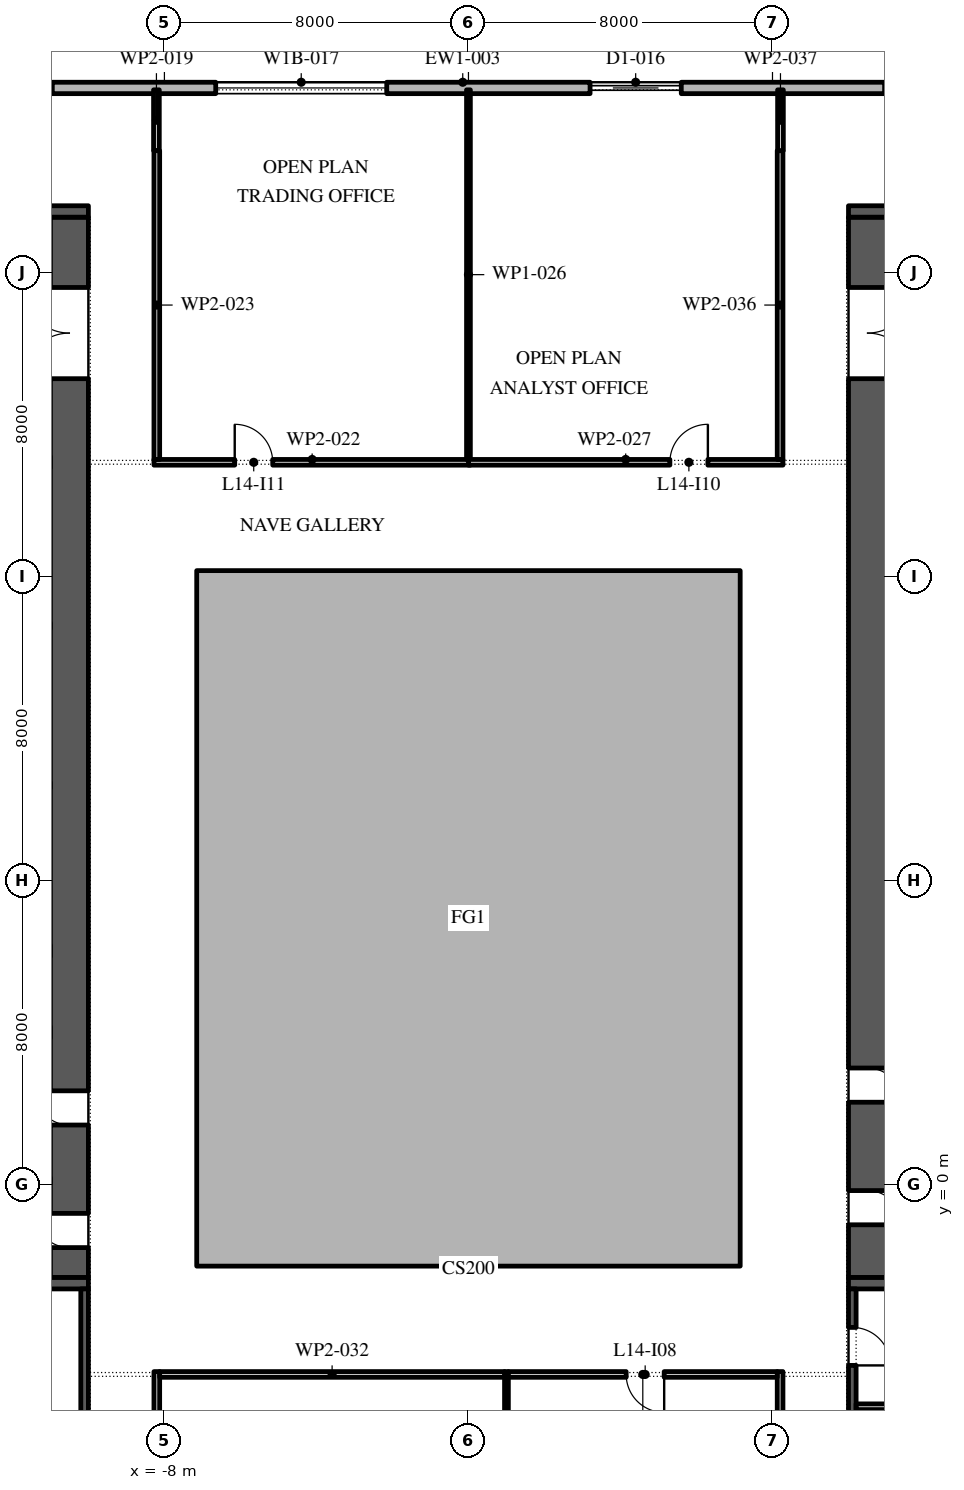
"""IFC4 building model, lengths in metres.
Left out: names, types, materials, properties, quantities, classifications, styles, units other than length and angle.
Written with IfcOpenShell. Run it as: python <this file> out.ifc"""

import sys

from ifc_helpers import new_model, si_unit, direction, frame, frame_2d, origin, place, context, subcontext, project, spatial, polyline, rectangle, outline, extrude, element, fill, save


model = new_model("IFC4")
c1 = context("Model", 3, precision=1e-05, world=origin(), true_north=direction((0.0, 1.0)))
c2 = subcontext(c1, "Body", "Model", "MODEL_VIEW")
j1 = project(units=[si_unit("LENGTHUNIT", "METRE"), si_unit("PLANEANGLEUNIT", "RADIAN")], contexts=[c1])
p1 = place(None, origin())
s1 = spatial("IfcSite", under=j1, at=p1, CompositionType="ELEMENT")
p2 = place(p1, origin())
s2 = spatial("IfcBuilding", under=s1, at=p2, CompositionType="ELEMENT")
p3 = place(p2, frame((0.0, 0.0, 69.0)))
s3 = spatial("IfcBuildingStorey", under=s2, at=p3, CompositionType="ELEMENT", Elevation=69.0)
p4 = place(p3, origin())
e1 = element("IfcWall", 1, at=p4, inside=s3, PredefinedType="STANDARD", context=c2, shape_type="SweptSolid", body=[
    extrude(outline(polyline([(-7.15, -2.15), (7.15, -2.15), (7.15, 16.15), (-7.15, 16.15), (-7.15, -2.15)]), holes=[polyline([(-7.0, -2.0), (-7.0, 16.0), (7.0, 16.0), (7.0, -2.0), (-7.0, -2.0)])]), origin(), (0.0, 0.0, 1.0), 4.0),
])
p5 = place(p3, frame((26.1, 28.85, 0.0), z_axis=(0.0, 0.0, 1.0), x_axis=(-1.0, 0.0, 0.0)))
e2 = element("IfcWall", 2, at=p5, inside=s3, PredefinedType="STANDARD", context=c2, shape_type="SweptSolid", body=[
    extrude(rectangle(XDim=52.5, YDim=0.3, at=frame_2d((26.25, 0.0))), origin(), (0.0, 0.0, 1.0), 4.0),
])
p6 = place(p5, frame((2.0, 0.0, 0.45)))
e3 = element("IfcOpeningElement", 3, at=p6, cuts=e2, PredefinedType="OPENING", context=c2, shape_type="SweptSolid", body=[
    extrude(rectangle(XDim=4.5, YDim=2.95, at=frame_2d((2.25, 1.475))), frame((0.0, 0.16, 0.0), z_axis=(0.0, -1.0, 0.0), x_axis=(1.0, 0.0, 0.0)), (0.0, 0.0, 1.0), 0.32),
])
p7 = place(p5, frame((10.65, 0.0, 0.45)))
e4 = element("IfcOpeningElement", 4, at=p7, cuts=e2, PredefinedType="OPENING", context=c2, shape_type="SweptSolid", body=[
    extrude(rectangle(XDim=4.5, YDim=2.95, at=frame_2d((2.25, 1.475))), frame((0.0, 0.16, 0.0), z_axis=(0.0, -1.0, 0.0), x_axis=(1.0, 0.0, 0.0)), (0.0, 0.0, 1.0), 0.32),
])
p8 = place(p5, frame((20.5, 0.0, 0.0)))
e5 = element("IfcOpeningElement", 5, at=p8, cuts=e2, PredefinedType="OPENING", context=c2, shape_type="SweptSolid", body=[
    extrude(rectangle(XDim=2.4, YDim=3.5, at=frame_2d((1.2, 1.75))), frame((0.0, 0.16, 0.0), z_axis=(0.0, -1.0, 0.0), x_axis=(1.0, 0.0, 0.0)), (0.0, 0.0, 1.0), 0.32),
])
p9 = place(p5, frame((28.25, 0.0, 0.45)))
e6 = element("IfcOpeningElement", 6, at=p9, cuts=e2, PredefinedType="OPENING", context=c2, shape_type="SweptSolid", body=[
    extrude(rectangle(XDim=4.5, YDim=2.95, at=frame_2d((2.25, 1.475))), frame((0.0, 0.16, 0.0), z_axis=(0.0, -1.0, 0.0), x_axis=(1.0, 0.0, 0.0)), (0.0, 0.0, 1.0), 0.32),
])
p10 = place(p5, frame((37.05, 0.0, 0.45)))
e7 = element("IfcOpeningElement", 7, at=p10, cuts=e2, PredefinedType="OPENING", context=c2, shape_type="SweptSolid", body=[
    extrude(rectangle(XDim=4.5, YDim=2.95, at=frame_2d((2.25, 1.475))), frame((0.0, 0.16, 0.0), z_axis=(0.0, -1.0, 0.0), x_axis=(1.0, 0.0, 0.0)), (0.0, 0.0, 1.0), 0.32),
])
p11 = place(p5, frame((45.85, 0.0, 0.45)))
e8 = element("IfcOpeningElement", 8, at=p11, cuts=e2, PredefinedType="OPENING", context=c2, shape_type="SweptSolid", body=[
    extrude(rectangle(XDim=4.5, YDim=2.95, at=frame_2d((2.25, 1.475))), frame((0.0, 0.16, 0.0), z_axis=(0.0, -1.0, 0.0), x_axis=(1.0, 0.0, 0.0)), (0.0, 0.0, 1.0), 0.32),
])
p12 = place(p3, frame((-10.5, -2.45, 0.0), z_axis=(0.0, 0.0, 1.0), x_axis=(0.0, 1.0, 0.0)))
e9 = element("IfcWall", 9, at=p12, inside=s3, PredefinedType="SHEAR", context=c2, shape_type="SweptSolid", body=[
    extrude(rectangle(XDim=27.9, YDim=1.0, at=frame_2d((13.95, 0.0))), origin(), (0.0, 0.0, 1.0), 4.0),
])
p13 = place(p12, frame((23.65, 0.0, 0.0)))
e10 = element("IfcOpeningElement", 10, at=p13, cuts=e9, PredefinedType="OPENING", context=c2, shape_type="SweptSolid", body=[
    extrude(rectangle(XDim=2.4, YDim=2.1, at=frame_2d((1.2, 1.05))), frame((0.0, 0.51, 0.0), z_axis=(0.0, -1.0, 0.0), x_axis=(1.0, 0.0, 0.0)), (0.0, 0.0, 1.0), 1.02),
])
p14 = place(p12, frame((0.788, 0.0, 0.0)))
e11 = element("IfcOpeningElement", 11, at=p14, cuts=e9, PredefinedType="OPENING", context=c2, shape_type="SweptSolid", body=[
    extrude(rectangle(XDim=0.9, YDim=2.1, at=frame_2d((0.45, 1.05))), frame((0.0, 0.51, 0.0), z_axis=(0.0, -1.0, 0.0), x_axis=(1.0, 0.0, 0.0)), (0.0, 0.0, 1.0), 1.02),
])
p15 = place(p12, frame((4.012, 0.0, 0.0)))
e12 = element("IfcOpeningElement", 12, at=p15, cuts=e9, PredefinedType="OPENING", context=c2, shape_type="SweptSolid", body=[
    extrude(rectangle(XDim=0.9, YDim=2.1, at=frame_2d((0.45, 1.05))), frame((0.0, 0.51, 0.0), z_axis=(0.0, -1.0, 0.0), x_axis=(1.0, 0.0, 0.0)), (0.0, 0.0, 1.0), 1.02),
])
for number, where, z_axis, x_axis in (
    (13, (-22.0, -2.6, 0.0), (0.0, 0.0, 1.0), (1.0, 0.0, 0.0)),
    (14, (-22.0, 25.6, 0.0), (0.0, 0.0, 1.0), (1.0, 0.0, 0.0)),
):
    element("IfcWall", number, at=place(p3, frame(where, z_axis=z_axis, x_axis=x_axis)), inside=s3, PredefinedType="SHEAR", context=c2, shape_type="SweptSolid", body=[
        extrude(rectangle(XDim=12.0, YDim=0.3, at=frame_2d((6.0, 0.0))), origin(), (0.0, 0.0, 1.0), 4.0),
    ])
p16 = place(p3, frame((-10.1, -15.8, 0.0), z_axis=(0.0, 0.0, 1.0), x_axis=(0.0, 1.0, 0.0)))
e15 = element("IfcWall", 15, at=p16, inside=s3, PredefinedType="SHEAR", context=c2, shape_type="SweptSolid", body=[
    extrude(rectangle(XDim=13.05, YDim=0.2, at=frame_2d((6.525, 0.0))), origin(), (0.0, 0.0, 1.0), 4.0),
])
p17 = place(p16, frame((6.075, 0.0, 0.0)))
e16 = element("IfcOpeningElement", 16, at=p17, cuts=e15, PredefinedType="OPENING", context=c2, shape_type="SweptSolid", body=[
    extrude(rectangle(XDim=0.9, YDim=2.1, at=frame_2d((0.45, 1.05))), frame((0.0, 0.11, 0.0), z_axis=(0.0, -1.0, 0.0), x_axis=(1.0, 0.0, 0.0)), (0.0, 0.0, 1.0), 0.22),
])
p18 = place(p3, frame((10.5, -2.45, 0.0), z_axis=(0.0, 0.0, 1.0), x_axis=(0.0, 1.0, 0.0)))
e17 = element("IfcWall", 17, at=p18, inside=s3, PredefinedType="SHEAR", context=c2, shape_type="SweptSolid", body=[
    extrude(rectangle(XDim=27.9, YDim=1.0, at=frame_2d((13.95, 0.0))), origin(), (0.0, 0.0, 1.0), 4.0),
])
p19 = place(p18, frame((23.65, 0.0, 0.0)))
e18 = element("IfcOpeningElement", 18, at=p19, cuts=e17, PredefinedType="OPENING", context=c2, shape_type="SweptSolid", body=[
    extrude(rectangle(XDim=2.4, YDim=2.1, at=frame_2d((1.2, 1.05))), frame((0.0, 0.51, 0.0), z_axis=(0.0, -1.0, 0.0), x_axis=(1.0, 0.0, 0.0)), (0.0, 0.0, 1.0), 1.02),
])
p20 = place(p18, frame((1.387, 0.0, 0.0)))
e19 = element("IfcOpeningElement", 19, at=p20, cuts=e17, PredefinedType="OPENING", context=c2, shape_type="SweptSolid", body=[
    extrude(rectangle(XDim=0.9, YDim=2.1, at=frame_2d((0.45, 1.05))), frame((0.0, 0.51, 0.0), z_axis=(0.0, -1.0, 0.0), x_axis=(1.0, 0.0, 0.0)), (0.0, 0.0, 1.0), 1.02),
])
p21 = place(p18, frame((4.613, 0.0, 0.0)))
e20 = element("IfcOpeningElement", 20, at=p21, cuts=e17, PredefinedType="OPENING", context=c2, shape_type="SweptSolid", body=[
    extrude(rectangle(XDim=0.9, YDim=2.1, at=frame_2d((0.45, 1.05))), frame((0.0, 0.51, 0.0), z_axis=(0.0, -1.0, 0.0), x_axis=(1.0, 0.0, 0.0)), (0.0, 0.0, 1.0), 1.02),
])
for number, where, z_axis, x_axis in (
    (21, (10.0, -2.6, 0.0), (0.0, 0.0, 1.0), (1.0, 0.0, 0.0)),
    (22, (10.0, 25.6, 0.0), (0.0, 0.0, 1.0), (1.0, 0.0, 0.0)),
):
    element("IfcWall", number, at=place(p3, frame(where, z_axis=z_axis, x_axis=x_axis)), inside=s3, PredefinedType="SHEAR", context=c2, shape_type="SweptSolid", body=[
        extrude(rectangle(XDim=12.0, YDim=0.3, at=frame_2d((6.0, 0.0))), origin(), (0.0, 0.0, 1.0), 4.0),
    ])
p22 = place(p3, frame((10.1, -15.8, 0.0), z_axis=(0.0, 0.0, 1.0), x_axis=(0.0, 1.0, 0.0)))
e23 = element("IfcWall", 23, at=p22, inside=s3, PredefinedType="SHEAR", context=c2, shape_type="SweptSolid", body=[
    extrude(rectangle(XDim=13.05, YDim=0.2, at=frame_2d((6.525, 0.0))), origin(), (0.0, 0.0, 1.0), 4.0),
])
p23 = place(p22, frame((4.488, 0.0, 0.0)))
e24 = element("IfcOpeningElement", 24, at=p23, cuts=e23, PredefinedType="OPENING", context=c2, shape_type="SweptSolid", body=[
    extrude(rectangle(XDim=0.9, YDim=2.1, at=frame_2d((0.45, 1.05))), frame((0.0, 0.11, 0.0), z_axis=(0.0, -1.0, 0.0), x_axis=(1.0, 0.0, 0.0)), (0.0, 0.0, 1.0), 0.22),
])
p24 = place(p22, frame((11.038, 0.0, 0.0)))
e25 = element("IfcOpeningElement", 25, at=p24, cuts=e23, PredefinedType="OPENING", context=c2, shape_type="SweptSolid", body=[
    extrude(rectangle(XDim=1.0, YDim=2.1, at=frame_2d((0.5, 1.05))), frame((0.0, 0.11, 0.0), z_axis=(0.0, -1.0, 0.0), x_axis=(1.0, 0.0, 0.0)), (0.0, 0.0, 1.0), 0.22),
])
p25 = place(p3, frame((10.2, -5.85, 0.0), z_axis=(0.0, 0.0, 1.0), x_axis=(1.0, 0.0, 0.0)))
e26 = element("IfcWall", 26, at=p25, inside=s3, PredefinedType="PARTITIONING", context=c2, shape_type="SweptSolid", body=[
    extrude(rectangle(XDim=11.6, YDim=0.15, at=frame_2d((5.8, 0.0))), origin(), (0.0, 0.0, 1.0), 4.0),
])
p26 = place(p3, frame((-8.21, 28.8, 0.0), z_axis=(0.0, 0.0, 1.0), x_axis=(0.0, -1.0, 0.0)))
e27 = element("IfcWall", 27, at=p26, inside=s3, PredefinedType="PARTITIONING", context=c2, shape_type="SweptSolid", body=[
    extrude(rectangle(XDim=1.6, YDim=0.15, at=frame_2d((0.8, 0.0))), origin(), (0.0, 0.0, 1.0), 4.0),
])
p27 = place(p3, frame((-8.2, -4.925, 0.0), z_axis=(0.0, 0.0, 1.0), x_axis=(0.0, -1.0, 0.0)))
e28 = element("IfcWall", 28, at=p27, inside=s3, PredefinedType="PARTITIONING", context=c2, shape_type="SweptSolid", body=[
    extrude(rectangle(XDim=12.8, YDim=0.15, at=frame_2d((6.4, 0.0))), origin(), (0.0, 0.0, 1.0), 4.0),
])
p28 = place(p27, frame((7.225, 0.0, 0.0)))
e29 = element("IfcOpeningElement", 29, at=p28, cuts=e28, PredefinedType="OPENING", context=c2, shape_type="SweptSolid", body=[
    extrude(rectangle(XDim=1.0, YDim=2.1, at=frame_2d((0.5, 1.05))), frame((0.0, 0.085, 0.0), z_axis=(0.0, -1.0, 0.0), x_axis=(1.0, 0.0, 0.0)), (0.0, 0.0, 1.0), 0.17),
])
p29 = place(p3, frame((-8.275, 19.0, 0.0), z_axis=(0.0, 0.0, 1.0), x_axis=(1.0, 0.0, 0.0)))
e30 = element("IfcWall", 30, at=p29, inside=s3, PredefinedType="PARTITIONING", context=c2, shape_type="SweptSolid", body=[
    extrude(rectangle(XDim=8.325, YDim=0.15, at=frame_2d((4.163, 0.0))), origin(), (0.0, 0.0, 1.0), 4.0),
])
p30 = place(p29, frame((2.125, 0.0, 0.0)))
e31 = element("IfcOpeningElement", 31, at=p30, cuts=e30, PredefinedType="OPENING", context=c2, shape_type="SweptSolid", body=[
    extrude(rectangle(XDim=1.0, YDim=2.1, at=frame_2d((0.5, 1.05))), frame((0.0, 0.085, 0.0), z_axis=(0.0, -1.0, 0.0), x_axis=(1.0, 0.0, 0.0)), (0.0, 0.0, 1.0), 0.17),
])
p31 = place(p3, frame((-8.2, 27.2, 0.0), z_axis=(0.0, 0.0, 1.0), x_axis=(0.0, -1.0, 0.0)))
e32 = element("IfcWall", 32, at=p31, inside=s3, PredefinedType="PARTITIONING", context=c2, shape_type="SweptSolid", body=[
    extrude(rectangle(XDim=8.125, YDim=0.15, at=frame_2d((4.062, 0.0))), origin(), (0.0, 0.0, 1.0), 4.0),
])
p32 = place(p3, frame((0.0, 19.075, 0.0), z_axis=(0.0, 0.0, 1.0), x_axis=(0.0, 1.0, 0.0)))
e33 = element("IfcWall", 33, at=p32, inside=s3, PredefinedType="PARTITIONING", context=c2, shape_type="SweptSolid", body=[
    extrude(rectangle(XDim=9.725, YDim=0.1, at=frame_2d((4.863, 0.0))), origin(), (0.0, 0.0, 1.0), 4.0),
])
p33 = place(p3, frame((0.0, 19.0, 0.0), z_axis=(0.0, 0.0, 1.0), x_axis=(1.0, 0.0, 0.0)))
e34 = element("IfcWall", 34, at=p33, inside=s3, PredefinedType="PARTITIONING", context=c2, shape_type="SweptSolid", body=[
    extrude(rectangle(XDim=8.275, YDim=0.15, at=frame_2d((4.137, 0.0))), origin(), (0.0, 0.0, 1.0), 4.0),
])
p34 = place(p33, frame((5.3, 0.0, 0.0)))
e35 = element("IfcOpeningElement", 35, at=p34, cuts=e34, PredefinedType="OPENING", context=c2, shape_type="SweptSolid", body=[
    extrude(rectangle(XDim=1.0, YDim=2.1, at=frame_2d((0.5, 1.05))), frame((0.0, 0.085, 0.0), z_axis=(0.0, -1.0, 0.0), x_axis=(1.0, 0.0, 0.0)), (0.0, 0.0, 1.0), 0.17),
])
p35 = place(p3, frame((1.0, -11.45, 0.0), z_axis=(0.0, 0.0, 1.0), x_axis=(0.0, 1.0, 0.0)))
e36 = element("IfcWall", 36, at=p35, inside=s3, PredefinedType="PARTITIONING", context=c2, shape_type="SweptSolid", body=[
    extrude(rectangle(XDim=6.525, YDim=0.1, at=frame_2d((3.262, 0.0))), origin(), (0.0, 0.0, 1.0), 4.0),
])
p36 = place(p3, frame((0.95, -5.0, 0.0), z_axis=(0.0, 0.0, 1.0), x_axis=(-1.0, 0.0, 0.0)))
e37 = element("IfcWall", 37, at=p36, inside=s3, PredefinedType="PARTITIONING", context=c2, shape_type="SweptSolid", body=[
    extrude(rectangle(XDim=9.075, YDim=0.15, at=frame_2d((4.538, 0.0))), origin(), (0.0, 0.0, 1.0), 4.0),
])
p37 = place(p3, frame((8.2, -11.45, 0.0), z_axis=(0.0, 0.0, 1.0), x_axis=(0.0, 1.0, 0.0)))
e38 = element("IfcWall", 38, at=p37, inside=s3, PredefinedType="PARTITIONING", context=c2, shape_type="SweptSolid", body=[
    extrude(rectangle(XDim=6.525, YDim=0.15, at=frame_2d((3.262, 0.0))), origin(), (0.0, 0.0, 1.0), 4.0),
])
p38 = place(p3, frame((8.125, -5.0, 0.0), z_axis=(0.0, 0.0, 1.0), x_axis=(-1.0, 0.0, 0.0)))
e39 = element("IfcWall", 39, at=p38, inside=s3, PredefinedType="PARTITIONING", context=c2, shape_type="SweptSolid", body=[
    extrude(rectangle(XDim=7.075, YDim=0.15, at=frame_2d((3.538, 0.0))), origin(), (0.0, 0.0, 1.0), 4.0),
])
p39 = place(p38, frame((2.975, 0.0, 0.0)))
e40 = element("IfcOpeningElement", 40, at=p39, cuts=e39, PredefinedType="OPENING", context=c2, shape_type="SweptSolid", body=[
    extrude(rectangle(XDim=1.0, YDim=2.1, at=frame_2d((0.5, 1.05))), frame((0.0, 0.085, 0.0), z_axis=(0.0, -1.0, 0.0), x_axis=(1.0, 0.0, 0.0)), (0.0, 0.0, 1.0), 0.17),
])
p40 = place(p3, frame((8.2, 19.075, 0.0), z_axis=(0.0, 0.0, 1.0), x_axis=(0.0, 1.0, 0.0)))
e41 = element("IfcWall", 41, at=p40, inside=s3, PredefinedType="PARTITIONING", context=c2, shape_type="SweptSolid", body=[
    extrude(rectangle(XDim=8.125, YDim=0.15, at=frame_2d((4.062, 0.0))), origin(), (0.0, 0.0, 1.0), 4.0),
])
p41 = place(p3, frame((8.21, 27.2, 0.0), z_axis=(0.0, 0.0, 1.0), x_axis=(0.0, 1.0, 0.0)))
e42 = element("IfcWall", 42, at=p41, inside=s3, PredefinedType="PARTITIONING", context=c2, shape_type="SweptSolid", body=[
    extrude(rectangle(XDim=1.6, YDim=0.15, at=frame_2d((0.8, 0.0))), origin(), (0.0, 0.0, 1.0), 4.0),
])
p42 = place(p8, origin())
e43 = element("IfcDoor", 43, at=p42, inside=s3, OperationType="DOUBLE_DOOR_SLIDING", PredefinedType="DOOR", context=c2, shape_type="SweptSolid", body=[
    extrude(rectangle(XDim=2.4, YDim=3.5, at=frame_2d((1.2, 1.75))), frame((0.0, 0.025, 0.0), z_axis=(0.0, -1.0, 0.0), x_axis=(1.0, 0.0, 0.0)), (0.0, 0.0, 1.0), 0.05),
])
fill(e5, e43)
p43 = place(p9, origin())
e44 = element("IfcWindow", 44, at=p43, inside=s3, PartitioningType="DOUBLE_PANEL_VERTICAL", PredefinedType="WINDOW", context=c2, shape_type="SweptSolid", body=[
    extrude(rectangle(XDim=4.5, YDim=2.95, at=frame_2d((2.25, 1.475))), frame((0.0, 0.03, 0.0), z_axis=(0.0, -1.0, 0.0), x_axis=(1.0, 0.0, 0.0)), (0.0, 0.0, 1.0), 0.06),
])
fill(e6, e44)
p44 = place(p13, origin())
e45 = element("IfcDoor", 45, at=p44, inside=s3, OperationType="DOUBLE_DOOR_SINGLE_SWING", PredefinedType="DOOR", context=c2, shape_type="SweptSolid", body=[
    extrude(rectangle(XDim=2.4, YDim=2.1, at=frame_2d((1.2, 1.05))), frame((0.0, 0.025, 0.0), z_axis=(0.0, -1.0, 0.0), x_axis=(1.0, 0.0, 0.0)), (0.0, 0.0, 1.0), 0.05),
])
fill(e10, e45)
p45 = place(p19, frame((2.4, 0.0, 0.0), z_axis=(0.0, 0.0, 1.0), x_axis=(-1.0, 0.0, 0.0)))
e46 = element("IfcDoor", 46, at=p45, inside=s3, OperationType="DOUBLE_DOOR_SINGLE_SWING", PredefinedType="DOOR", context=c2, shape_type="SweptSolid", body=[
    extrude(rectangle(XDim=2.4, YDim=2.1, at=frame_2d((1.2, 1.05))), frame((0.0, 0.025, 0.0), z_axis=(0.0, -1.0, 0.0), x_axis=(1.0, 0.0, 0.0)), (0.0, 0.0, 1.0), 0.05),
])
fill(e18, e46)
p46 = place(p24, frame((1.0, -0.15, 0.0), z_axis=(0.0, 0.0, 1.0), x_axis=(-1.0, 0.0, 0.0)))
e47 = element("IfcDoor", 47, at=p46, inside=s3, OperationType="SINGLE_SWING_LEFT", PredefinedType="DOOR", context=c2, shape_type="SweptSolid", body=[
    extrude(rectangle(XDim=1.0, YDim=2.1, at=frame_2d((0.5, 1.05))), frame((0.0, -0.05, 0.0), z_axis=(0.0, -1.0, 0.0), x_axis=(1.0, 0.0, 0.0)), (0.0, 0.0, 1.0), 0.05),
])
fill(e25, e47)
p47 = place(p39, origin())
e48 = element("IfcDoor", 48, at=p47, inside=s3, OperationType="SINGLE_SWING_RIGHT", PredefinedType="DOOR", context=c2, shape_type="SweptSolid", body=[
    extrude(rectangle(XDim=1.0, YDim=2.1, at=frame_2d((0.5, 1.05))), frame((0.0, 0.025, 0.0), z_axis=(0.0, -1.0, 0.0), x_axis=(1.0, 0.0, 0.0)), (0.0, 0.0, 1.0), 0.05),
])
fill(e40, e48)
p48 = place(p34, origin())
e49 = element("IfcDoor", 49, at=p48, inside=s3, OperationType="SINGLE_SWING_LEFT", PredefinedType="DOOR", context=c2, shape_type="SweptSolid", body=[
    extrude(rectangle(XDim=1.0, YDim=2.1, at=frame_2d((0.5, 1.05))), frame((0.0, 0.025, 0.0), z_axis=(0.0, -1.0, 0.0), x_axis=(1.0, 0.0, 0.0)), (0.0, 0.0, 1.0), 0.05),
])
fill(e35, e49)
p49 = place(p30, origin())
e50 = element("IfcDoor", 50, at=p49, inside=s3, OperationType="SINGLE_SWING_RIGHT", PredefinedType="DOOR", context=c2, shape_type="SweptSolid", body=[
    extrude(rectangle(XDim=1.0, YDim=2.1, at=frame_2d((0.5, 1.05))), frame((0.0, 0.025, 0.0), z_axis=(0.0, -1.0, 0.0), x_axis=(1.0, 0.0, 0.0)), (0.0, 0.0, 1.0), 0.05),
])
fill(e31, e50)
save(model, sys.argv[1])
